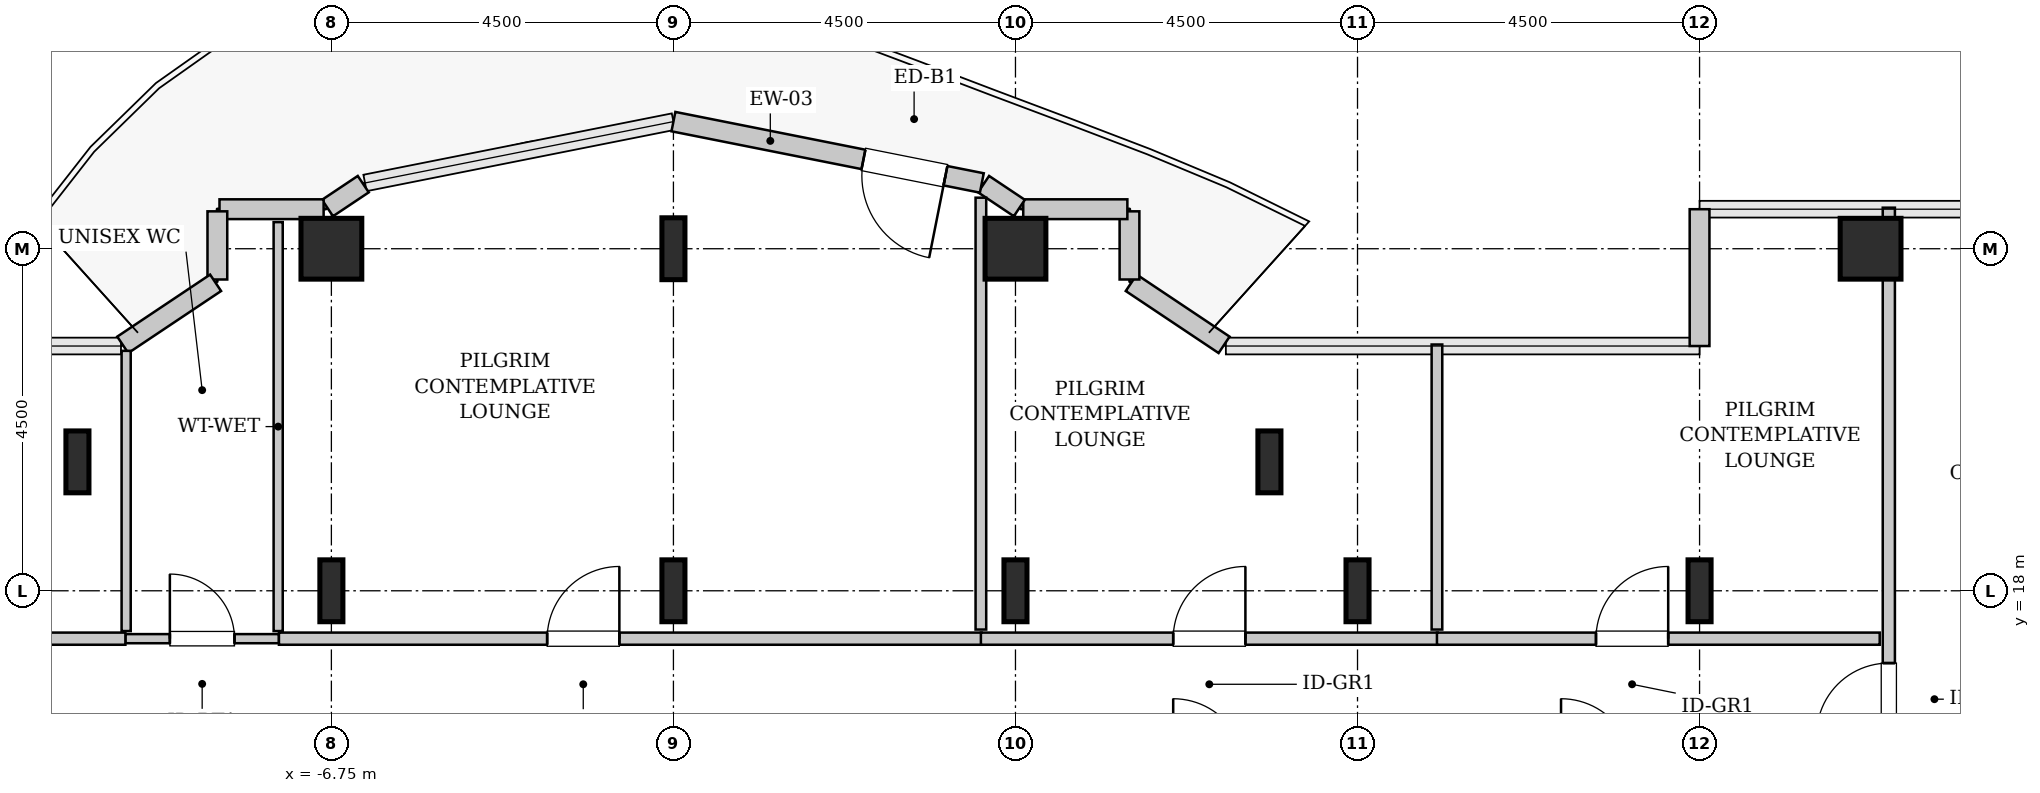
"""IFC4 building model, lengths in metres.
Left out: names, types, materials, properties, quantities, classifications, styles, units other than length and angle.
Written with IfcOpenShell. Run it as: python <this file> out.ifc"""

import sys

from ifc_helpers import new_model, si_unit, direction, frame, frame_2d, origin, origin_2d, place, context, subcontext, project, spatial, rectangle, hollow_rectangle, i_section, extrude, source, transform, mapped, element, fill, save


model = new_model("IFC4")
c1 = context("Model", 3, precision=1e-05, world=origin(), true_north=direction((0.0, 1.0)))
c2 = subcontext(c1, "Body", "Model", "MODEL_VIEW")
j1 = project(units=[si_unit("LENGTHUNIT", "METRE"), si_unit("PLANEANGLEUNIT", "RADIAN")], contexts=[c1])
p1 = place(None, origin())
s1 = spatial("IfcSite", under=j1, at=p1, CompositionType="ELEMENT")
p2 = place(p1, origin())
s2 = spatial("IfcBuilding", under=s1, at=p2, CompositionType="ELEMENT")
p3 = place(p2, frame((0.0, 0.0, 171.6)))
s3 = spatial("IfcBuildingStorey", under=s2, at=p3, CompositionType="ELEMENT", Elevation=171.6)
m1 = source(origin(), c2, "Body", "SweptSolid", [
    extrude(i_section(OverallWidth=0.303, OverallDepth=0.814, WebThickness=0.021, FlangeThickness=0.04, FilletRadius=0.03, at=origin_2d()), origin(), (0.0, 0.0, 1.0), 3.8),
])
for number, where, z_axis, x_axis in (
    (1, (-10.091, 19.696, 0.0), (0.0, 0.0, 1.0), (1.0, 0.0, 0.0)),
    (2, (-6.75, 18.0, 0.0), (0.0, 0.0, 1.0), (1.0, 0.0, 0.0)),
):
    element("IfcColumn", number, at=place(p3, frame(where, z_axis=z_axis, x_axis=x_axis)), inside=s3, PredefinedType="COLUMN", context=c2, shape_type="MappedRepresentation", body=[
        mapped(m1, transform((0.0, 0.0, 0.0), x_axis=(1.0, 0.0, 0.0), y_axis=(0.0, 1.0, 0.0), z_axis=(0.0, 0.0, 1.0), scale=1.0)),
    ])
m2 = source(origin(), c2, "Body", "SweptSolid", [
    extrude(hollow_rectangle(XDim=0.8, YDim=0.8, WallThickness=0.04, InnerFilletRadius=0.04, OuterFilletRadius=0.08, at=origin_2d()), origin(), (0.0, 0.0, 1.0), 3.8),
])
p4 = place(p3, frame((-6.75, 22.5, 0.0), z_axis=(0.0, 0.0, 1.0), x_axis=(1.0, 0.0, 0.0)))
e3 = element("IfcColumn", 3, at=p4, inside=s3, PredefinedType="COLUMN", context=c2, shape_type="MappedRepresentation", body=[
    mapped(m2, transform((0.0, 0.0, 0.0), x_axis=(1.0, 0.0, 0.0), y_axis=(0.0, 1.0, 0.0), z_axis=(0.0, 0.0, 1.0), scale=1.0)),
])
for number, where, z_axis, x_axis in (
    (4, (-2.25, 18.0, 0.0), (0.0, 0.0, 1.0), (1.0, 0.0, 0.0)),
    (5, (-2.25, 22.5, 0.0), (0.0, 0.0, 1.0), (1.0, 0.0, 0.0)),
    (6, (2.25, 18.0, 0.0), (0.0, 0.0, 1.0), (1.0, 0.0, 0.0)),
):
    element("IfcColumn", number, at=place(p3, frame(where, z_axis=z_axis, x_axis=x_axis)), inside=s3, PredefinedType="COLUMN", context=c2, shape_type="MappedRepresentation", body=[
        mapped(m1, transform((0.0, 0.0, 0.0), x_axis=(1.0, 0.0, 0.0), y_axis=(0.0, 1.0, 0.0), z_axis=(0.0, 0.0, 1.0), scale=1.0)),
    ])
p5 = place(p3, frame((2.25, 22.5, 0.0), z_axis=(0.0, 0.0, 1.0), x_axis=(1.0, 0.0, 0.0)))
e7 = element("IfcColumn", 7, at=p5, inside=s3, PredefinedType="COLUMN", context=c2, shape_type="MappedRepresentation", body=[
    mapped(m2, transform((0.0, 0.0, 0.0), x_axis=(1.0, 0.0, 0.0), y_axis=(0.0, 1.0, 0.0), z_axis=(0.0, 0.0, 1.0), scale=1.0)),
])
for number, where, z_axis, x_axis in (
    (8, (5.591, 19.696, 0.0), (0.0, 0.0, 1.0), (1.0, 0.0, 0.0)),
    (9, (6.75, 18.0, 0.0), (0.0, 0.0, 1.0), (1.0, 0.0, 0.0)),
    (10, (11.25, 18.0, 0.0), (0.0, 0.0, 1.0), (1.0, 0.0, 0.0)),
):
    element("IfcColumn", number, at=place(p3, frame(where, z_axis=z_axis, x_axis=x_axis)), inside=s3, PredefinedType="COLUMN", context=c2, shape_type="MappedRepresentation", body=[
        mapped(m1, transform((0.0, 0.0, 0.0), x_axis=(1.0, 0.0, 0.0), y_axis=(0.0, 1.0, 0.0), z_axis=(0.0, 0.0, 1.0), scale=1.0)),
    ])
p6 = place(p3, frame((13.5, 22.5, 0.0), z_axis=(0.0, 0.0, 1.0), x_axis=(1.0, 0.0, 0.0)))
e11 = element("IfcColumn", 11, at=p6, inside=s3, PredefinedType="COLUMN", context=c2, shape_type="MappedRepresentation", body=[
    mapped(m2, transform((0.0, 0.0, 0.0), x_axis=(1.0, 0.0, 0.0), y_axis=(0.0, 1.0, 0.0), z_axis=(0.0, 0.0, 1.0), scale=1.0)),
])
m3 = source(origin(), c2, "Body", "SweptSolid", [
    extrude(rectangle(XDim=1.8, YDim=0.26, at=frame_2d((0.9, 0.0))), origin(), (0.0, 0.0, 1.0), 3.55),
])
p7 = place(p3, frame((11.25, 23.02, 0.0), z_axis=(0.0, 0.0, 1.0), x_axis=(0.0, -1.0, 0.0)))
e12 = element("IfcWall", 12, at=p7, inside=s3, PredefinedType="SOLIDWALL", context=c2, shape_type="MappedRepresentation", body=[
    mapped(m3, transform((0.0, 0.0, 0.0), x_axis=(1.0, 0.0, 0.0), y_axis=(0.0, 1.0, 0.0), z_axis=(0.0, 0.0, 1.0), scale=1.0)),
])
m4 = source(origin(), c2, "Body", "SweptSolid", [
    extrude(rectangle(XDim=1.469, YDim=0.26, at=frame_2d((0.734, 0.0))), origin(), (0.0, 0.0, 1.0), 3.55),
])
p8 = place(p3, frame((4.995, 21.236, 0.0), z_axis=(0.0, 0.0, 1.0), x_axis=(-0.831461760506, 0.555581983884, 0.0)))
e13 = element("IfcWall", 13, at=p8, inside=s3, PredefinedType="SOLIDWALL", context=c2, shape_type="MappedRepresentation", body=[
    mapped(m4, transform((0.0, 0.0, 0.0), x_axis=(1.0, 0.0, 0.0), y_axis=(0.0, 1.0, 0.0), z_axis=(0.0, 0.0, 1.0), scale=1.0)),
])
m5 = source(origin(), c2, "Body", "SweptSolid", [
    extrude(rectangle(XDim=0.897, YDim=0.26, at=frame_2d((0.448, 0.0))), origin(), (0.0, 0.0, 1.0), 3.55),
])
p9 = place(p3, frame((3.75, 22.095, 0.0), z_axis=(0.0, 0.0, 1.0), x_axis=(0.0, 1.0, 0.0)))
e14 = element("IfcWall", 14, at=p9, inside=s3, PredefinedType="SOLIDWALL", context=c2, shape_type="MappedRepresentation", body=[
    mapped(m5, transform((0.0, 0.0, 0.0), x_axis=(1.0, 0.0, 0.0), y_axis=(0.0, 1.0, 0.0), z_axis=(0.0, 0.0, 1.0), scale=1.0)),
])
m6 = source(origin(), c2, "Body", "SweptSolid", [
    extrude(rectangle(XDim=1.37, YDim=0.26, at=frame_2d((0.685, 0.0))), origin(), (0.0, 0.0, 1.0), 3.55),
])
p10 = place(p3, frame((3.722, 23.02, 0.0), z_axis=(0.0, 0.0, 1.0), x_axis=(-1.0, 0.0, 0.0)))
e15 = element("IfcWall", 15, at=p10, inside=s3, PredefinedType="SOLIDWALL", context=c2, shape_type="MappedRepresentation", body=[
    mapped(m6, transform((0.0, 0.0, 0.0), x_axis=(1.0, 0.0, 0.0), y_axis=(0.0, 1.0, 0.0), z_axis=(0.0, 0.0, 1.0), scale=1.0)),
])
m7 = source(origin(), c2, "Body", "SweptSolid", [
    extrude(rectangle(XDim=0.565, YDim=0.26, at=frame_2d((0.283, 0.0))), origin(), (0.0, 0.0, 1.0), 3.55),
])
p11 = place(p3, frame((2.301, 23.036, 0.0), z_axis=(0.0, 0.0, 1.0), x_axis=(-0.831651492666, 0.555297933317, 0.0)))
e16 = element("IfcWall", 16, at=p11, inside=s3, PredefinedType="SOLIDWALL", context=c2, shape_type="MappedRepresentation", body=[
    mapped(m7, transform((0.0, 0.0, 0.0), x_axis=(1.0, 0.0, 0.0), y_axis=(0.0, 1.0, 0.0), z_axis=(0.0, 0.0, 1.0), scale=1.0)),
])
m8 = source(origin(), c2, "Body", "SweptSolid", [
    extrude(rectangle(XDim=4.137, YDim=0.26, at=frame_2d((2.068, 0.0))), origin(), (0.0, 0.0, 1.0), 3.55),
])
p12 = place(p3, frame((1.807, 23.365, 0.0), z_axis=(0.0, 0.0, 1.0), x_axis=(-0.980782170794, 0.195105954428, 0.0)))
e17 = element("IfcWall", 17, at=p12, inside=s3, PredefinedType="SOLIDWALL", context=c2, shape_type="MappedRepresentation", body=[
    mapped(m8, transform((0.0, 0.0, 0.0), x_axis=(1.0, 0.0, 0.0), y_axis=(0.0, 1.0, 0.0), z_axis=(0.0, 0.0, 1.0), scale=1.0)),
])
p13 = place(p12, frame((0.488, 0.0, 0.0)))
e18 = element("IfcOpeningElement", 18, at=p13, cuts=e17, PredefinedType="OPENING", context=c2, shape_type="SweptSolid", body=[
    extrude(rectangle(XDim=1.1, YDim=2.2, at=frame_2d((0.55, 1.1))), frame((0.0, 0.14, 0.0), z_axis=(0.0, -1.0, 0.0), x_axis=(1.0, 0.0, 0.0)), (0.0, 0.0, 1.0), 0.28),
])
p14 = place(p3, frame((-6.331, 23.35, 0.0), z_axis=(0.0, 0.0, 1.0), x_axis=(-0.831651492666, -0.555297933317, 0.0)))
e19 = element("IfcWall", 19, at=p14, inside=s3, PredefinedType="SOLIDWALL", context=c2, shape_type="MappedRepresentation", body=[
    mapped(m7, transform((0.0, 0.0, 0.0), x_axis=(1.0, 0.0, 0.0), y_axis=(0.0, 1.0, 0.0), z_axis=(0.0, 0.0, 1.0), scale=1.0)),
])
p15 = place(p3, frame((-6.852, 23.02, 0.0), z_axis=(0.0, 0.0, 1.0), x_axis=(-1.0, 0.0, 0.0)))
e20 = element("IfcWall", 20, at=p15, inside=s3, PredefinedType="SOLIDWALL", context=c2, shape_type="MappedRepresentation", body=[
    mapped(m6, transform((0.0, 0.0, 0.0), x_axis=(1.0, 0.0, 0.0), y_axis=(0.0, 1.0, 0.0), z_axis=(0.0, 0.0, 1.0), scale=1.0)),
])
p16 = place(p3, frame((-8.25, 22.992, 0.0), z_axis=(0.0, 0.0, 1.0), x_axis=(0.0, -1.0, 0.0)))
e21 = element("IfcWall", 21, at=p16, inside=s3, PredefinedType="SOLIDWALL", context=c2, shape_type="MappedRepresentation", body=[
    mapped(m5, transform((0.0, 0.0, 0.0), x_axis=(1.0, 0.0, 0.0), y_axis=(0.0, 1.0, 0.0), z_axis=(0.0, 0.0, 1.0), scale=1.0)),
])
p17 = place(p3, frame((-8.273, 22.052, 0.0), z_axis=(0.0, 0.0, 1.0), x_axis=(-0.831461760506, -0.555581983884, 0.0)))
e22 = element("IfcWall", 22, at=p17, inside=s3, PredefinedType="SOLIDWALL", context=c2, shape_type="MappedRepresentation", body=[
    mapped(m4, transform((0.0, 0.0, 0.0), x_axis=(1.0, 0.0, 0.0), y_axis=(0.0, 1.0, 0.0), z_axis=(0.0, 0.0, 1.0), scale=1.0)),
])
m9 = source(origin(), c2, "Body", "SweptSolid", [
    extrude(rectangle(XDim=2.02, YDim=0.12, at=frame_2d((1.01, 0.0))), origin(), (0.0, 0.0, 1.0), 3.535),
])
p18 = place(p3, frame((-9.46, 17.37, 0.0), z_axis=(0.0, 0.0, 1.0), x_axis=(1.0, 0.0, 0.0)))
e23 = element("IfcWall", 23, at=p18, inside=s3, PredefinedType="PLUMBINGWALL", context=c2, shape_type="MappedRepresentation", body=[
    mapped(m9, transform((0.0, 0.0, 0.0), x_axis=(1.0, 0.0, 0.0), y_axis=(0.0, 1.0, 0.0), z_axis=(0.0, 0.0, 1.0), scale=1.0)),
])
p19 = place(p18, frame((0.585, 0.0, 0.0)))
e24 = element("IfcOpeningElement", 24, at=p19, cuts=e23, PredefinedType="OPENING", context=c2, shape_type="SweptSolid", body=[
    extrude(rectangle(XDim=0.85, YDim=2.1, at=frame_2d((0.425, 1.05))), frame((0.0, 0.07, 0.0), z_axis=(0.0, -1.0, 0.0), x_axis=(1.0, 0.0, 0.0)), (0.0, 0.0, 1.0), 0.14),
])
m10 = source(origin(), c2, "Body", "SweptSolid", [
    extrude(rectangle(XDim=5.38, YDim=0.12, at=frame_2d((2.69, 0.0))), origin(), (0.0, 0.0, 1.0), 3.535),
])
p20 = place(p3, frame((-7.45, 17.47, 0.0), z_axis=(0.0, 0.0, 1.0), x_axis=(0.0, 1.0, 0.0)))
e25 = element("IfcWall", 25, at=p20, inside=s3, PredefinedType="PLUMBINGWALL", context=c2, shape_type="MappedRepresentation", body=[
    mapped(m10, transform((0.0, 0.0, 0.0), x_axis=(1.0, 0.0, 0.0), y_axis=(0.0, 1.0, 0.0), z_axis=(0.0, 0.0, 1.0), scale=1.0)),
])
m11 = source(origin(), c2, "Body", "SweptSolid", [
    extrude(rectangle(XDim=3.687, YDim=0.12, at=frame_2d((1.843, 0.0))), origin(), (0.0, 0.0, 1.0), 3.535),
])
p21 = place(p3, frame((-9.45, 17.47, 0.0), z_axis=(0.0, 0.0, 1.0), x_axis=(0.0, 1.0, 0.0)))
e26 = element("IfcWall", 26, at=p21, inside=s3, PredefinedType="PLUMBINGWALL", context=c2, shape_type="MappedRepresentation", body=[
    mapped(m11, transform((0.0, 0.0, 0.0), x_axis=(1.0, 0.0, 0.0), y_axis=(0.0, 1.0, 0.0), z_axis=(0.0, 0.0, 1.0), scale=1.0)),
])
m12 = source(origin(), c2, "Body", "SweptSolid", [
    extrude(rectangle(XDim=7.302, YDim=0.16, at=frame_2d((3.651, 0.0))), origin(), (0.0, 0.0, 1.0), 3.535),
])
p22 = place(p3, frame((13.74, 15.738, 0.0), z_axis=(0.0, 0.0, 1.0), x_axis=(0.0, 1.0, 0.0)))
e27 = element("IfcWall", 27, at=p22, inside=s3, PredefinedType="PARTITIONING", context=c2, shape_type="MappedRepresentation", body=[
    mapped(m12, transform((0.0, 0.0, 0.0), x_axis=(1.0, 0.0, 0.0), y_axis=(0.0, 1.0, 0.0), z_axis=(0.0, 0.0, 1.0), scale=1.0)),
])
p23 = place(p22, frame((0.361, 0.0, 0.0)))
e28 = element("IfcOpeningElement", 28, at=p23, cuts=e27, PredefinedType="OPENING", context=c2, shape_type="SweptSolid", body=[
    extrude(rectangle(XDim=0.95, YDim=2.1, at=frame_2d((0.475, 1.05))), frame((0.0, 0.09, 0.0), z_axis=(0.0, -1.0, 0.0), x_axis=(1.0, 0.0, 0.0)), (0.0, 0.0, 1.0), 0.18),
])
m13 = source(origin(), c2, "Body", "SweptSolid", [
    extrude(rectangle(XDim=9.245, YDim=0.16, at=frame_2d((4.623, 0.0))), origin(), (0.0, 0.0, 1.0), 3.535),
])
p24 = place(p3, frame((-7.44, 17.37, 0.0), z_axis=(0.0, 0.0, 1.0), x_axis=(1.0, 0.0, 0.0)))
e29 = element("IfcWall", 29, at=p24, inside=s3, PredefinedType="PARTITIONING", context=c2, shape_type="MappedRepresentation", body=[
    mapped(m13, transform((0.0, 0.0, 0.0), x_axis=(1.0, 0.0, 0.0), y_axis=(0.0, 1.0, 0.0), z_axis=(0.0, 0.0, 1.0), scale=1.0)),
])
p25 = place(p24, frame((3.529, 0.0, 0.0)))
e30 = element("IfcOpeningElement", 30, at=p25, cuts=e29, PredefinedType="OPENING", context=c2, shape_type="SweptSolid", body=[
    extrude(rectangle(XDim=0.95, YDim=2.1, at=frame_2d((0.475, 1.05))), frame((0.0, 0.09, 0.0), z_axis=(0.0, -1.0, 0.0), x_axis=(1.0, 0.0, 0.0)), (0.0, 0.0, 1.0), 0.18),
])
m14 = source(origin(), c2, "Body", "SweptSolid", [
    extrude(rectangle(XDim=5.681, YDim=0.14, at=frame_2d((2.841, 0.0))), origin(), (0.0, 0.0, 1.0), 2.875),
])
p26 = place(p3, frame((1.795, 17.49, 0.0), z_axis=(0.0, 0.0, 1.0), x_axis=(0.0, 1.0, 0.0)))
e31 = element("IfcWall", 31, at=p26, inside=s3, PredefinedType="PARTITIONING", context=c2, shape_type="MappedRepresentation", body=[
    mapped(m14, transform((0.0, 0.0, 0.0), x_axis=(1.0, 0.0, 0.0), y_axis=(0.0, 1.0, 0.0), z_axis=(0.0, 0.0, 1.0), scale=1.0)),
])
m15 = source(origin(), c2, "Body", "SweptSolid", [
    extrude(rectangle(XDim=4.16, YDim=0.16, at=frame_2d((2.08, 0.0))), origin(), (0.0, 0.0, 1.0), 3.535),
])
p27 = place(p3, frame((-13.62, 17.37, 0.0), z_axis=(0.0, 0.0, 1.0), x_axis=(1.0, 0.0, 0.0)))
e32 = element("IfcWall", 32, at=p27, inside=s3, PredefinedType="PARTITIONING", context=c2, shape_type="MappedRepresentation", body=[
    mapped(m15, transform((0.0, 0.0, 0.0), x_axis=(1.0, 0.0, 0.0), y_axis=(0.0, 1.0, 0.0), z_axis=(0.0, 0.0, 1.0), scale=1.0)),
])
p28 = place(p27, frame((0.969, 0.0, 0.0)))
e33 = element("IfcOpeningElement", 33, at=p28, cuts=e32, PredefinedType="OPENING", context=c2, shape_type="SweptSolid", body=[
    extrude(rectangle(XDim=0.95, YDim=2.1, at=frame_2d((0.475, 1.05))), frame((0.0, 0.09, 0.0), z_axis=(0.0, -1.0, 0.0), x_axis=(1.0, 0.0, 0.0)), (0.0, 0.0, 1.0), 0.18),
])
m16 = source(origin(), c2, "Body", "SweptSolid", [
    extrude(rectangle(XDim=6.01, YDim=0.16, at=frame_2d((3.005, 0.0))), origin(), (0.0, 0.0, 1.0), 3.535),
])
p29 = place(p3, frame((1.795, 17.37, 0.0), z_axis=(0.0, 0.0, 1.0), x_axis=(1.0, 0.0, 0.0)))
e34 = element("IfcWall", 34, at=p29, inside=s3, PredefinedType="PARTITIONING", context=c2, shape_type="MappedRepresentation", body=[
    mapped(m16, transform((0.0, 0.0, 0.0), x_axis=(1.0, 0.0, 0.0), y_axis=(0.0, 1.0, 0.0), z_axis=(0.0, 0.0, 1.0), scale=1.0)),
])
p30 = place(p29, frame((2.53, 0.0, 0.0)))
e35 = element("IfcOpeningElement", 35, at=p30, cuts=e34, PredefinedType="OPENING", context=c2, shape_type="SweptSolid", body=[
    extrude(rectangle(XDim=0.95, YDim=2.1, at=frame_2d((0.475, 1.05))), frame((0.0, 0.09, 0.0), z_axis=(0.0, -1.0, 0.0), x_axis=(1.0, 0.0, 0.0)), (0.0, 0.0, 1.0), 0.18),
])
m17 = source(origin(), c2, "Body", "SweptSolid", [
    extrude(rectangle(XDim=3.75, YDim=0.14, at=frame_2d((1.875, 0.0))), origin(), (0.0, 0.0, 1.0), 3.535),
])
p31 = place(p3, frame((7.795, 17.49, 0.0), z_axis=(0.0, 0.0, 1.0), x_axis=(0.0, 1.0, 0.0)))
e36 = element("IfcWall", 36, at=p31, inside=s3, PredefinedType="PARTITIONING", context=c2, shape_type="MappedRepresentation", body=[
    mapped(m17, transform((0.0, 0.0, 0.0), x_axis=(1.0, 0.0, 0.0), y_axis=(0.0, 1.0, 0.0), z_axis=(0.0, 0.0, 1.0), scale=1.0)),
])
m18 = source(origin(), c2, "Body", "SweptSolid", [
    extrude(rectangle(XDim=5.825, YDim=0.16, at=frame_2d((2.913, 0.0))), origin(), (0.0, 0.0, 1.0), 3.535),
])
p32 = place(p3, frame((7.795, 17.37, 0.0), z_axis=(0.0, 0.0, 1.0), x_axis=(1.0, 0.0, 0.0)))
e37 = element("IfcWall", 37, at=p32, inside=s3, PredefinedType="PARTITIONING", context=c2, shape_type="MappedRepresentation", body=[
    mapped(m18, transform((0.0, 0.0, 0.0), x_axis=(1.0, 0.0, 0.0), y_axis=(0.0, 1.0, 0.0), z_axis=(0.0, 0.0, 1.0), scale=1.0)),
])
p33 = place(p32, frame((2.092, 0.0, 0.0)))
e38 = element("IfcOpeningElement", 38, at=p33, cuts=e37, PredefinedType="OPENING", context=c2, shape_type="SweptSolid", body=[
    extrude(rectangle(XDim=0.95, YDim=2.1, at=frame_2d((0.475, 1.05))), frame((0.0, 0.09, 0.0), z_axis=(0.0, -1.0, 0.0), x_axis=(1.0, 0.0, 0.0)), (0.0, 0.0, 1.0), 0.18),
])
m19 = source(origin(), c2, "Body", "SweptSolid", [
    extrude(rectangle(XDim=1.1, YDim=2.2, at=frame_2d((0.55, 1.1))), frame((0.0, 0.025, 0.0), z_axis=(0.0, -1.0, 0.0), x_axis=(1.0, 0.0, 0.0)), (0.0, 0.0, 1.0), 0.05),
])
p34 = place(p13, origin())
e39 = element("IfcDoor", 39, at=p34, inside=s3, OperationType="SINGLE_SWING_LEFT", PredefinedType="DOOR", context=c2, shape_type="MappedRepresentation", body=[
    mapped(m19, transform((0.0, 0.0, 0.0), x_axis=(1.0, 0.0, 0.0), y_axis=(0.0, 1.0, 0.0), z_axis=(0.0, 0.0, 1.0), scale=1.0)),
])
fill(e18, e39)
m20 = source(origin(), c2, "Body", "SweptSolid", [
    extrude(rectangle(XDim=0.85, YDim=2.1, at=frame_2d((0.425, 1.05))), frame((0.0, 0.025, 0.0), z_axis=(0.0, -1.0, 0.0), x_axis=(1.0, 0.0, 0.0)), (0.0, 0.0, 1.0), 0.05),
])
p35 = place(p19, origin())
e40 = element("IfcDoor", 40, at=p35, inside=s3, OperationType="SINGLE_SWING_LEFT", PredefinedType="DOOR", context=c2, shape_type="MappedRepresentation", body=[
    mapped(m20, transform((0.0, 0.0, 0.0), x_axis=(1.0, 0.0, 0.0), y_axis=(0.0, 1.0, 0.0), z_axis=(0.0, 0.0, 1.0), scale=1.0)),
])
fill(e24, e40)
m21 = source(origin(), c2, "Body", "SweptSolid", [
    extrude(rectangle(XDim=0.95, YDim=2.1, at=frame_2d((0.475, 1.05))), frame((0.0, 0.025, 0.0), z_axis=(0.0, -1.0, 0.0), x_axis=(1.0, 0.0, 0.0)), (0.0, 0.0, 1.0), 0.05),
])
p36 = place(p23, origin())
e41 = element("IfcDoor", 41, at=p36, inside=s3, OperationType="SINGLE_SWING_LEFT", PredefinedType="DOOR", context=c2, shape_type="MappedRepresentation", body=[
    mapped(m21, transform((0.0, 0.0, 0.0), x_axis=(1.0, 0.0, 0.0), y_axis=(0.0, 1.0, 0.0), z_axis=(0.0, 0.0, 1.0), scale=1.0)),
])
fill(e28, e41)
p37 = place(p25, origin())
e42 = element("IfcDoor", 42, at=p37, inside=s3, OperationType="SINGLE_SWING_RIGHT", PredefinedType="DOOR", context=c2, shape_type="MappedRepresentation", body=[
    mapped(m21, transform((0.0, 0.0, 0.0), x_axis=(1.0, 0.0, 0.0), y_axis=(0.0, 1.0, 0.0), z_axis=(0.0, 0.0, 1.0), scale=1.0)),
])
fill(e30, e42)
p38 = place(p30, origin())
e43 = element("IfcDoor", 43, at=p38, inside=s3, OperationType="SINGLE_SWING_RIGHT", PredefinedType="DOOR", context=c2, shape_type="MappedRepresentation", body=[
    mapped(m21, transform((0.0, 0.0, 0.0), x_axis=(1.0, 0.0, 0.0), y_axis=(0.0, 1.0, 0.0), z_axis=(0.0, 0.0, 1.0), scale=1.0)),
])
fill(e35, e43)
p39 = place(p33, origin())
e44 = element("IfcDoor", 44, at=p39, inside=s3, OperationType="SINGLE_SWING_RIGHT", PredefinedType="DOOR", context=c2, shape_type="MappedRepresentation", body=[
    mapped(m21, transform((0.0, 0.0, 0.0), x_axis=(1.0, 0.0, 0.0), y_axis=(0.0, 1.0, 0.0), z_axis=(0.0, 0.0, 1.0), scale=1.0)),
])
fill(e38, e44)
save(model, sys.argv[1])
